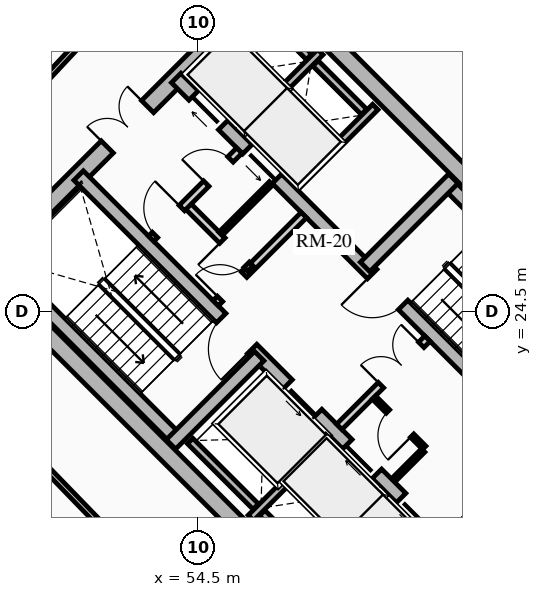
"""IFC4 building model, lengths in metres.
Left out: names, types, materials, properties, quantities, classifications, styles, units other than length and angle.
Written with IfcOpenShell. Run it as: python <this file> out.ifc"""

import sys

from ifc_helpers import new_model, si_unit, direction, frame, frame_2d, origin, place, context, subcontext, project, spatial, rectangle, extrude, source, transform, mapped, element, fill, save


model = new_model("IFC4")
c1 = context("Model", 3, precision=1e-05, world=origin(), true_north=direction((0.0, 1.0)))
c2 = subcontext(c1, "Body", "Model", "MODEL_VIEW")
j1 = project(units=[si_unit("LENGTHUNIT", "METRE"), si_unit("PLANEANGLEUNIT", "RADIAN")], contexts=[c1])
p1 = place(None, origin())
s1 = spatial("IfcSite", under=j1, at=p1, CompositionType="ELEMENT")
p2 = place(p1, origin())
s2 = spatial("IfcBuilding", under=s1, at=p2, CompositionType="ELEMENT")
p3 = place(p2, frame((0.0, 0.0, 129.16)))
s3 = spatial("IfcBuildingStorey", under=s2, at=p3, CompositionType="ELEMENT", Elevation=129.16)
for number, where, z_axis, x_axis in (
    (1, (58.737, 15.697, 0.0), (0.0, 0.0, 1.0), (-0.707, 0.707, 0.0)),
    (2, (66.303, 23.263, 0.0), (0.0, 0.0, 1.0), (-0.707, 0.707, 0.0)),
):
    element("IfcWall", number, at=place(p3, frame(where, z_axis=z_axis, x_axis=x_axis)), inside=s3, PredefinedType="SHEAR", context=c2, shape_type="SweptSolid", body=[
        extrude(rectangle(XDim=14.2, YDim=0.45, at=frame_2d((7.1, 0.0))), origin(), (0.0, 0.0, 1.0), 3.72),
    ])
p4 = place(p3, frame((58.578, 15.856, 0.0), z_axis=(0.0, 0.0, 1.0), x_axis=(0.707106781187, 0.707106781187, 0.0)))
e3 = element("IfcWall", 3, at=p4, inside=s3, PredefinedType="SHEAR", context=c2, shape_type="SweptSolid", body=[
    extrude(rectangle(XDim=10.7, YDim=0.45, at=frame_2d((5.35, 0.0))), origin(), (0.0, 0.0, 1.0), 3.72),
])
m1 = source(origin(), c2, "Body", "SweptSolid", [
    extrude(rectangle(XDim=1.5, YDim=2.02, at=frame_2d((0.75, 1.01))), frame((0.0, 0.235, 0.0), z_axis=(0.0, -1.0, 0.0), x_axis=(1.0, 0.0, 0.0)), (0.0, 0.0, 1.0), 0.47),
])
p5 = place(p4, frame((5.45, 0.0, 0.0)))
e4 = element("IfcOpeningElement", 4, at=p5, cuts=e3, PredefinedType="OPENING", context=c2, shape_type="MappedRepresentation", body=[
    mapped(m1, transform((0.0, 0.0, 0.0), x_axis=(1.0, 0.0, 0.0), y_axis=(0.0, 1.0, 0.0), z_axis=(0.0, 0.0, 1.0), scale=1.0)),
])
p6 = place(p3, frame((48.856, 25.578, 0.0), z_axis=(0.0, 0.0, 1.0), x_axis=(0.707106781187, 0.707106781187, 0.0)))
e5 = element("IfcWall", 5, at=p6, inside=s3, PredefinedType="SHEAR", context=c2, shape_type="SweptSolid", body=[
    extrude(rectangle(XDim=10.7, YDim=0.45, at=frame_2d((5.35, 0.0))), origin(), (0.0, 0.0, 1.0), 3.72),
])
p7 = place(p6, frame((4.6, 0.0, 0.0)))
e6 = element("IfcOpeningElement", 6, at=p7, cuts=e5, PredefinedType="OPENING", context=c2, shape_type="MappedRepresentation", body=[
    mapped(m1, transform((0.0, 0.0, 0.0), x_axis=(1.0, 0.0, 0.0), y_axis=(0.0, 1.0, 0.0), z_axis=(0.0, 0.0, 1.0), scale=1.0)),
])
p8 = place(p3, frame((61.078, 18.355, 0.0), z_axis=(0.0, 0.0, 1.0), x_axis=(-0.707106781187, 0.707106781187, 0.0)))
e7 = element("IfcWall", 7, at=p8, inside=s3, PredefinedType="SHEAR", context=c2, shape_type="SweptSolid", body=[
    extrude(rectangle(XDim=13.75, YDim=0.35, at=frame_2d((6.875, 0.0))), origin(), (0.0, 0.0, 1.0), 3.72),
])
m2 = source(origin(), c2, "Body", "SweptSolid", [
    extrude(rectangle(XDim=1.1, YDim=2.015, at=frame_2d((0.55, 1.007))), frame((0.0, 0.185, 0.0), z_axis=(0.0, -1.0, 0.0), x_axis=(1.0, 0.0, 0.0)), (0.0, 0.0, 1.0), 0.37),
])
p9 = place(p8, frame((4.875, 0.0, 0.0)))
e8 = element("IfcOpeningElement", 8, at=p9, cuts=e7, PredefinedType="OPENING", context=c2, shape_type="MappedRepresentation", body=[
    mapped(m2, transform((0.0, 0.0, 0.0), x_axis=(1.0, 0.0, 0.0), y_axis=(0.0, 1.0, 0.0), z_axis=(0.0, 0.0, 1.0), scale=1.0)),
])
p10 = place(p8, frame((0.65, 0.0, 0.0)))
e9 = element("IfcOpeningElement", 9, at=p10, cuts=e7, PredefinedType="OPENING", context=c2, shape_type="MappedRepresentation", body=[
    mapped(m2, transform((0.0, 0.0, 0.0), x_axis=(1.0, 0.0, 0.0), y_axis=(0.0, 1.0, 0.0), z_axis=(0.0, 0.0, 1.0), scale=1.0)),
])
p11 = place(p8, frame((2.65, 0.0, 0.0)))
e10 = element("IfcOpeningElement", 10, at=p11, cuts=e7, PredefinedType="OPENING", context=c2, shape_type="MappedRepresentation", body=[
    mapped(m2, transform((0.0, 0.0, 0.0), x_axis=(1.0, 0.0, 0.0), y_axis=(0.0, 1.0, 0.0), z_axis=(0.0, 0.0, 1.0), scale=1.0)),
])
m3 = source(origin(), c2, "Body", "SweptSolid", [
    extrude(rectangle(XDim=1.15, YDim=2.02, at=frame_2d((0.575, 1.01))), frame((0.0, 0.185, 0.0), z_axis=(0.0, -1.0, 0.0), x_axis=(1.0, 0.0, 0.0)), (0.0, 0.0, 1.0), 0.37),
])
p12 = place(p8, frame((7.295, 0.0, 0.0)))
e11 = element("IfcOpeningElement", 11, at=p12, cuts=e7, PredefinedType="OPENING", context=c2, shape_type="MappedRepresentation", body=[
    mapped(m3, transform((0.0, 0.0, 0.0), x_axis=(1.0, 0.0, 0.0), y_axis=(0.0, 1.0, 0.0), z_axis=(0.0, 0.0, 1.0), scale=1.0)),
])
p13 = place(p3, frame((63.645, 20.922, 0.0), z_axis=(0.0, 0.0, 1.0), x_axis=(-0.707106781187, 0.707106781187, 0.0)))
e12 = element("IfcWall", 12, at=p13, inside=s3, PredefinedType="SHEAR", context=c2, shape_type="SweptSolid", body=[
    extrude(rectangle(XDim=13.75, YDim=0.35, at=frame_2d((6.875, 0.0))), origin(), (0.0, 0.0, 1.0), 3.72),
])
p14 = place(p13, frame((10.0, 0.0, 0.0)))
e13 = element("IfcOpeningElement", 13, at=p14, cuts=e12, PredefinedType="OPENING", context=c2, shape_type="MappedRepresentation", body=[
    mapped(m2, transform((0.0, 0.0, 0.0), x_axis=(1.0, 0.0, 0.0), y_axis=(0.0, 1.0, 0.0), z_axis=(0.0, 0.0, 1.0), scale=1.0)),
])
p15 = place(p13, frame((12.0, 0.0, 0.0)))
e14 = element("IfcOpeningElement", 14, at=p15, cuts=e12, PredefinedType="OPENING", context=c2, shape_type="MappedRepresentation", body=[
    mapped(m2, transform((0.0, 0.0, 0.0), x_axis=(1.0, 0.0, 0.0), y_axis=(0.0, 1.0, 0.0), z_axis=(0.0, 0.0, 1.0), scale=1.0)),
])
p16 = place(p13, frame((5.305, 0.0, 0.0)))
e15 = element("IfcOpeningElement", 15, at=p16, cuts=e12, PredefinedType="OPENING", context=c2, shape_type="MappedRepresentation", body=[
    mapped(m3, transform((0.0, 0.0, 0.0), x_axis=(1.0, 0.0, 0.0), y_axis=(0.0, 1.0, 0.0), z_axis=(0.0, 0.0, 1.0), scale=1.0)),
])
p17 = place(p3, frame((53.922, 21.141, 0.0), z_axis=(0.0, 0.0, 1.0), x_axis=(-0.707088616009, 0.707124945897, 0.0)))
e16 = element("IfcWall", 16, at=p17, inside=s3, PredefinedType="SHEAR", context=c2, shape_type="SweptSolid", body=[
    extrude(rectangle(XDim=6.72, YDim=0.35, at=frame_2d((3.36, 0.0))), origin(), (0.0, 0.0, 1.0), 3.72),
])
p18 = place(p3, frame((53.784, 21.003, 0.0), z_axis=(0.0, 0.0, 1.0), x_axis=(0.707106781187, 0.707106781187, 0.0)))
e17 = element("IfcWall", 17, at=p18, inside=s3, PredefinedType="SHEAR", context=c2, shape_type="SweptSolid", body=[
    extrude(rectangle(XDim=3.285, YDim=0.35, at=frame_2d((1.643, 0.0))), origin(), (0.0, 0.0, 1.0), 3.72),
])
p19 = place(p3, frame((65.83, 23.107, 0.0), z_axis=(0.0, 0.0, 1.0), x_axis=(-0.707088616009, 0.707124945897, 0.0)))
e18 = element("IfcWall", 18, at=p19, inside=s3, PredefinedType="SHEAR", context=c2, shape_type="SweptSolid", body=[
    extrude(rectangle(XDim=6.72, YDim=0.35, at=frame_2d((3.36, 0.0))), origin(), (0.0, 0.0, 1.0), 3.72),
])
p20 = place(p3, frame((58.893, 25.674, 0.0), z_axis=(0.0, 0.0, 1.0), x_axis=(0.707106781187, 0.707106781187, 0.0)))
e19 = element("IfcWall", 19, at=p20, inside=s3, PredefinedType="SHEAR", context=c2, shape_type="SweptSolid", body=[
    extrude(rectangle(XDim=3.285, YDim=0.35, at=frame_2d((1.643, 0.0))), origin(), (0.0, 0.0, 1.0), 3.72),
])
p21 = place(p3, frame((55.888, 19.069, 0.0), z_axis=(0.0, 0.0, 1.0), x_axis=(0.707106781187, 0.707106781187, 0.0)))
e20 = element("IfcWall", 20, at=p21, inside=s3, PredefinedType="SHEAR", context=c2, shape_type="SweptSolid", body=[
    extrude(rectangle(XDim=2.97, YDim=0.2, at=frame_2d((1.485, 0.0))), origin(), (0.0, 0.0, 1.0), 3.72),
])
p22 = place(p3, frame((56.015, 19.366, 0.0), z_axis=(0.0, 0.0, 1.0), x_axis=(-0.707106781187, 0.707106781187, 0.0)))
e21 = element("IfcWall", 21, at=p22, inside=s3, PredefinedType="SHEAR", context=c2, shape_type="SweptSolid", body=[
    extrude(rectangle(XDim=2.44, YDim=0.2, at=frame_2d((1.22, 0.0))), origin(), (0.0, 0.0, 1.0), 3.72),
])
p23 = place(p3, frame((57.284, 17.673, 0.0), z_axis=(0.0, 0.0, 1.0), x_axis=(0.707147878904, 0.70706568108, 0.0)))
e22 = element("IfcWall", 22, at=p23, inside=s3, PredefinedType="SHEAR", context=c2, shape_type="SweptSolid", body=[
    extrude(rectangle(XDim=2.97, YDim=0.2, at=frame_2d((1.485, 0.0))), origin(), (0.0, 0.0, 1.0), 3.72),
])
p24 = place(p3, frame((57.412, 17.97, 0.0), z_axis=(0.0, 0.0, 1.0), x_axis=(-0.707106781187, 0.707106781187, 0.0)))
e23 = element("IfcWall", 23, at=p24, inside=s3, PredefinedType="SHEAR", context=c2, shape_type="SweptSolid", body=[
    extrude(rectangle(XDim=1.735, YDim=0.2, at=frame_2d((0.867, 0.0))), origin(), (0.0, 0.0, 1.0), 3.72),
])
p25 = place(p3, frame((57.062, 27.781, 0.0), z_axis=(0.0, 0.0, 1.0), x_axis=(0.707106781187, 0.707106781187, 0.0)))
e24 = element("IfcWall", 24, at=p25, inside=s3, PredefinedType="SHEAR", context=c2, shape_type="SweptSolid", body=[
    extrude(rectangle(XDim=2.97, YDim=0.2, at=frame_2d((1.485, 0.0))), origin(), (0.0, 0.0, 1.0), 3.72),
])
p26 = place(p3, frame((55.615, 29.227, 0.0), z_axis=(0.0, 0.0, 1.0), x_axis=(0.707147878904, 0.70706568108, 0.0)))
e25 = element("IfcWall", 25, at=p26, inside=s3, PredefinedType="SHEAR", context=c2, shape_type="SweptSolid", body=[
    extrude(rectangle(XDim=2.97, YDim=0.2, at=frame_2d((1.485, 0.0))), origin(), (0.0, 0.0, 1.0), 3.72),
])
p27 = place(p3, frame((58.865, 29.754, 0.0), z_axis=(0.0, 0.0, 1.0), x_axis=(-0.707174411312, 0.707039144592, 0.0)))
e26 = element("IfcWall", 26, at=p27, inside=s3, PredefinedType="SHEAR", context=c2, shape_type="SweptSolid", body=[
    extrude(rectangle(XDim=1.805, YDim=0.2, at=frame_2d((0.902, 0.0))), origin(), (0.0, 0.0, 1.0), 3.72),
])
p28 = place(p3, frame((57.419, 31.2, 0.0), z_axis=(0.0, 0.0, 1.0), x_axis=(-0.707032117043, 0.707181437447, 0.0)))
e27 = element("IfcWall", 27, at=p28, inside=s3, PredefinedType="SHEAR", context=c2, shape_type="SweptSolid", body=[
    extrude(rectangle(XDim=1.635, YDim=0.2, at=frame_2d((0.817, 0.0))), origin(), (0.0, 0.0, 1.0), 3.72),
])
p29 = place(p3, frame((58.214, 21.467, 0.0), z_axis=(0.0, 0.0, 1.0), x_axis=(0.707106781187, 0.707106781187, 0.0)))
e28 = element("IfcWall", 28, at=p29, inside=s3, PredefinedType="PARTITIONING", context=c2, shape_type="SweptSolid", body=[
    extrude(rectangle(XDim=3.28, YDim=0.2, at=frame_2d((1.64, 0.0))), origin(), (0.0, 0.0, 1.0), 3.425),
])
m4 = source(origin(), c2, "Body", "SweptSolid", [
    extrude(rectangle(XDim=1.5, YDim=2.02, at=frame_2d((0.75, 1.01))), frame((0.0, 0.11, 0.0), z_axis=(0.0, -1.0, 0.0), x_axis=(1.0, 0.0, 0.0)), (0.0, 0.0, 1.0), 0.22),
])
p30 = place(p29, frame((1.55, 0.0, 0.0)))
e29 = element("IfcOpeningElement", 29, at=p30, cuts=e28, PredefinedType="OPENING", context=c2, shape_type="MappedRepresentation", body=[
    mapped(m4, transform((0.0, 0.0, 0.0), x_axis=(1.0, 0.0, 0.0), y_axis=(0.0, 1.0, 0.0), z_axis=(0.0, 0.0, 1.0), scale=1.0)),
])
p31 = place(p3, frame((54.961, 24.719, 0.0), z_axis=(0.0, 0.0, 1.0), x_axis=(0.707106781187, 0.707106781187, 0.0)))
e30 = element("IfcWall", 30, at=p31, inside=s3, PredefinedType="PARTITIONING", context=c2, shape_type="SweptSolid", body=[
    extrude(rectangle(XDim=3.28, YDim=0.2, at=frame_2d((1.64, 0.0))), origin(), (0.0, 0.0, 1.0), 3.425),
])
m5 = source(origin(), c2, "Body", "SweptSolid", [
    extrude(rectangle(XDim=0.9, YDim=2.005, at=frame_2d((0.45, 1.002))), frame((0.0, 0.11, 0.0), z_axis=(0.0, -1.0, 0.0), x_axis=(1.0, 0.0, 0.0)), (0.0, 0.0, 1.0), 0.22),
])
p32 = place(p31, frame((0.16, 0.0, 0.0)))
e31 = element("IfcOpeningElement", 31, at=p32, cuts=e30, PredefinedType="OPENING", context=c2, shape_type="MappedRepresentation", body=[
    mapped(m5, transform((0.0, 0.0, 0.0), x_axis=(1.0, 0.0, 0.0), y_axis=(0.0, 1.0, 0.0), z_axis=(0.0, 0.0, 1.0), scale=1.0)),
])
p33 = place(p3, frame((55.874, 25.631, 0.0), z_axis=(0.0, 0.0, 1.0), x_axis=(-0.707157639372, 0.707055919343, 0.0)))
e32 = element("IfcWall", 32, at=p33, inside=s3, PredefinedType="PARTITIONING", context=c2, shape_type="SweptSolid", body=[
    extrude(rectangle(XDim=2.4, YDim=0.2, at=frame_2d((1.2, 0.0))), origin(), (0.0, 0.0, 1.0), 3.425),
])
p34 = place(p33, frame((0.14, 0.0, 0.0)))
e33 = element("IfcOpeningElement", 33, at=p34, cuts=e32, PredefinedType="OPENING", context=c2, shape_type="MappedRepresentation", body=[
    mapped(m5, transform((0.0, 0.0, 0.0), x_axis=(1.0, 0.0, 0.0), y_axis=(0.0, 1.0, 0.0), z_axis=(0.0, 0.0, 1.0), scale=1.0)),
])
p35 = place(p3, frame((53.264, 26.416, 0.0), z_axis=(0.0, 0.0, 1.0), x_axis=(0.707106781187, 0.707106781187, 0.0)))
e34 = element("IfcWall", 34, at=p35, inside=s3, PredefinedType="PARTITIONING", context=c2, shape_type="SweptSolid", body=[
    extrude(rectangle(XDim=3.28, YDim=0.2, at=frame_2d((1.64, 0.0))), origin(), (0.0, 0.0, 1.0), 3.425),
])
m6 = source(origin(), c2, "Body", "SweptSolid", [
    extrude(rectangle(XDim=1.0, YDim=2.015, at=frame_2d((0.5, 1.007))), frame((0.0, 0.11, 0.0), z_axis=(0.0, -1.0, 0.0), x_axis=(1.0, 0.0, 0.0)), (0.0, 0.0, 1.0), 0.22),
])
p36 = place(p35, frame((0.14, 0.0, 0.0)))
e35 = element("IfcOpeningElement", 35, at=p36, cuts=e34, PredefinedType="OPENING", context=c2, shape_type="MappedRepresentation", body=[
    mapped(m6, transform((0.0, 0.0, 0.0), x_axis=(1.0, 0.0, 0.0), y_axis=(0.0, 1.0, 0.0), z_axis=(0.0, 0.0, 1.0), scale=1.0)),
])
p37 = place(p35, frame((2.05, 0.0, 0.0)))
e36 = element("IfcOpeningElement", 36, at=p37, cuts=e34, PredefinedType="OPENING", context=c2, shape_type="MappedRepresentation", body=[
    mapped(m5, transform((0.0, 0.0, 0.0), x_axis=(1.0, 0.0, 0.0), y_axis=(0.0, 1.0, 0.0), z_axis=(0.0, 0.0, 1.0), scale=1.0)),
])
p38 = place(p3, frame((60.448, 20.915, 0.0), z_axis=(0.0, 0.0, 1.0), x_axis=(-0.707106781187, 0.707106781187, 0.0)))
e37 = element("IfcWall", 37, at=p38, inside=s3, PredefinedType="PARTITIONING", context=c2, shape_type="SweptSolid", body=[
    extrude(rectangle(XDim=1.87, YDim=0.125, at=frame_2d((0.935, 0.0))), origin(), (0.0, 0.0, 1.0), 3.425),
])
m7 = source(origin(), c2, "Body", "SweptSolid", [
    extrude(rectangle(XDim=0.9, YDim=2.005, at=frame_2d((0.45, 1.002))), frame((0.0, 0.073, 0.0), z_axis=(0.0, -1.0, 0.0), x_axis=(1.0, 0.0, 0.0)), (0.0, 0.0, 1.0), 0.145),
])
p39 = place(p38, frame((0.45, 0.0, 0.0)))
e38 = element("IfcOpeningElement", 38, at=p39, cuts=e37, PredefinedType="OPENING", context=c2, shape_type="MappedRepresentation", body=[
    mapped(m7, transform((0.0, 0.0, 0.0), x_axis=(1.0, 0.0, 0.0), y_axis=(0.0, 1.0, 0.0), z_axis=(0.0, 0.0, 1.0), scale=1.0)),
])
p40 = place(p3, frame((59.643, 20.066, 0.0), z_axis=(0.0, 0.0, 1.0), x_axis=(0.707106781187, 0.707106781187, 0.0)))
e39 = element("IfcWall", 39, at=p40, inside=s3, PredefinedType="PARTITIONING", context=c2, shape_type="SweptSolid", body=[
    extrude(rectangle(XDim=1.1, YDim=0.125, at=frame_2d((0.55, 0.0))), origin(), (0.0, 0.0, 1.0), 3.425),
])
p41 = place(p3, frame((55.089, 26.543, 0.0), z_axis=(0.0, 0.0, 1.0), x_axis=(0.707106781187, 0.707106781187, 0.0)))
e40 = element("IfcWall", 40, at=p41, inside=s3, PredefinedType="PARTITIONING", context=c2, shape_type="SweptSolid", body=[
    extrude(rectangle(XDim=1.88, YDim=0.125, at=frame_2d((0.94, 0.0))), origin(), (0.0, 0.0, 1.0), 3.425),
])
p42 = place(p3, frame((63.086, 30.086, 0.0), z_axis=(0.0, 0.0, 1.0), x_axis=(-0.699075897379, 0.715047473741, 0.0)))
e41 = element("IfcWall", 41, at=p42, inside=s3, PredefinedType="PARTITIONING", context=c2, shape_type="SweptSolid", body=[
    extrude(rectangle(XDim=6.114, YDim=0.15, at=frame_2d((3.057, 0.0))), origin(), (0.0, 0.0, 1.0), 2.995),
])
p43 = place(p3, frame((52.043, 32.28, 0.0), z_axis=(0.0, 0.0, 1.0), x_axis=(-0.682606081633, -0.730786519661, 0.0)))
e42 = element("IfcWall", 42, at=p43, inside=s3, PredefinedType="PARTITIONING", context=c2, shape_type="SweptSolid", body=[
    extrude(rectangle(XDim=6.527, YDim=0.15, at=frame_2d((3.263, 0.0))), origin(), (0.0, 0.0, 1.0), 2.995),
])
p44 = place(p3, frame((47.706, 23.253, 0.0), z_axis=(0.0, 0.0, 1.0), x_axis=(0.696179266346, -0.717867974707, 0.0)))
e43 = element("IfcWall", 43, at=p44, inside=s3, PredefinedType="PARTITIONING", context=c2, shape_type="SweptSolid", body=[
    extrude(rectangle(XDim=6.045, YDim=0.15, at=frame_2d((3.022, 0.0))), origin(), (0.0, 0.0, 1.0), 3.425),
])
m8 = source(origin(), c2, "Body", "SweptSolid", [
    extrude(rectangle(XDim=1.1, YDim=2.015, at=frame_2d((0.55, 1.007))), frame((0.0, 0.025, 0.0), z_axis=(0.0, -1.0, 0.0), x_axis=(1.0, 0.0, 0.0)), (0.0, 0.0, 1.0), 0.05),
])
p45 = place(p9, origin())
e44 = element("IfcDoor", 44, at=p45, inside=s3, OperationType="SLIDING_TO_LEFT", PredefinedType="DOOR", context=c2, shape_type="MappedRepresentation", body=[
    mapped(m8, transform((0.0, 0.0, 0.0), x_axis=(1.0, 0.0, 0.0), y_axis=(0.0, 1.0, 0.0), z_axis=(0.0, 0.0, 1.0), scale=1.0)),
])
fill(e8, e44)
p46 = place(p10, origin())
e45 = element("IfcDoor", 45, at=p46, inside=s3, OperationType="SLIDING_TO_LEFT", PredefinedType="DOOR", context=c2, shape_type="MappedRepresentation", body=[
    mapped(m8, transform((0.0, 0.0, 0.0), x_axis=(1.0, 0.0, 0.0), y_axis=(0.0, 1.0, 0.0), z_axis=(0.0, 0.0, 1.0), scale=1.0)),
])
fill(e9, e45)
p47 = place(p11, origin())
e46 = element("IfcDoor", 46, at=p47, inside=s3, OperationType="SLIDING_TO_RIGHT", PredefinedType="DOOR", context=c2, shape_type="MappedRepresentation", body=[
    mapped(m8, transform((0.0, 0.0, 0.0), x_axis=(1.0, 0.0, 0.0), y_axis=(0.0, 1.0, 0.0), z_axis=(0.0, 0.0, 1.0), scale=1.0)),
])
fill(e10, e46)
p48 = place(p14, origin())
e47 = element("IfcDoor", 47, at=p48, inside=s3, OperationType="SLIDING_TO_LEFT", PredefinedType="DOOR", context=c2, shape_type="MappedRepresentation", body=[
    mapped(m8, transform((0.0, 0.0, 0.0), x_axis=(1.0, 0.0, 0.0), y_axis=(0.0, 1.0, 0.0), z_axis=(0.0, 0.0, 1.0), scale=1.0)),
])
fill(e13, e47)
p49 = place(p15, origin())
e48 = element("IfcDoor", 48, at=p49, inside=s3, OperationType="SLIDING_TO_RIGHT", PredefinedType="DOOR", context=c2, shape_type="MappedRepresentation", body=[
    mapped(m8, transform((0.0, 0.0, 0.0), x_axis=(1.0, 0.0, 0.0), y_axis=(0.0, 1.0, 0.0), z_axis=(0.0, 0.0, 1.0), scale=1.0)),
])
fill(e14, e48)
m9 = source(origin(), c2, "Body", "SweptSolid", [
    extrude(rectangle(XDim=1.15, YDim=2.02, at=frame_2d((0.575, 1.01))), frame((0.0, 0.025, 0.0), z_axis=(0.0, -1.0, 0.0), x_axis=(1.0, 0.0, 0.0)), (0.0, 0.0, 1.0), 0.05),
])
p50 = place(p12, origin())
e49 = element("IfcDoor", 49, at=p50, inside=s3, OperationType="SINGLE_SWING_LEFT", PredefinedType="DOOR", context=c2, shape_type="MappedRepresentation", body=[
    mapped(m9, transform((0.0, 0.0, 0.0), x_axis=(1.0, 0.0, 0.0), y_axis=(0.0, 1.0, 0.0), z_axis=(0.0, 0.0, 1.0), scale=1.0)),
])
fill(e11, e49)
p51 = place(p16, origin())
e50 = element("IfcDoor", 50, at=p51, inside=s3, OperationType="SINGLE_SWING_RIGHT", PredefinedType="DOOR", context=c2, shape_type="MappedRepresentation", body=[
    mapped(m9, transform((0.0, 0.0, 0.0), x_axis=(1.0, 0.0, 0.0), y_axis=(0.0, 1.0, 0.0), z_axis=(0.0, 0.0, 1.0), scale=1.0)),
])
fill(e15, e50)
m10 = source(origin(), c2, "Body", "SweptSolid", [
    extrude(rectangle(XDim=1.5, YDim=2.02, at=frame_2d((0.75, 1.01))), frame((0.0, 0.025, 0.0), z_axis=(0.0, -1.0, 0.0), x_axis=(1.0, 0.0, 0.0)), (0.0, 0.0, 1.0), 0.05),
])
p52 = place(p7, origin())
e51 = element("IfcDoor", 51, at=p52, inside=s3, OperationType="DOUBLE_DOOR_SINGLE_SWING", PredefinedType="DOOR", context=c2, shape_type="MappedRepresentation", body=[
    mapped(m10, transform((0.0, 0.0, 0.0), x_axis=(1.0, 0.0, 0.0), y_axis=(0.0, 1.0, 0.0), z_axis=(0.0, 0.0, 1.0), scale=1.0)),
])
fill(e6, e51)
p53 = place(p30, origin())
e52 = element("IfcDoor", 52, at=p53, inside=s3, OperationType="DOUBLE_DOOR_SINGLE_SWING", PredefinedType="DOOR", context=c2, shape_type="MappedRepresentation", body=[
    mapped(m10, transform((0.0, 0.0, 0.0), x_axis=(1.0, 0.0, 0.0), y_axis=(0.0, 1.0, 0.0), z_axis=(0.0, 0.0, 1.0), scale=1.0)),
])
fill(e29, e52)
m11 = source(origin(), c2, "Body", "SweptSolid", [
    extrude(rectangle(XDim=0.9, YDim=2.005, at=frame_2d((0.45, 1.002))), frame((0.0, 0.025, 0.0), z_axis=(0.0, -1.0, 0.0), x_axis=(1.0, 0.0, 0.0)), (0.0, 0.0, 1.0), 0.05),
])
p54 = place(p32, origin())
e53 = element("IfcDoor", 53, at=p54, inside=s3, OperationType="SINGLE_SWING_LEFT", PredefinedType="DOOR", context=c2, shape_type="MappedRepresentation", body=[
    mapped(m11, transform((0.0, 0.0, 0.0), x_axis=(1.0, 0.0, 0.0), y_axis=(0.0, 1.0, 0.0), z_axis=(0.0, 0.0, 1.0), scale=1.0)),
])
fill(e31, e53)
m12 = source(origin(), c2, "Body", "SweptSolid", [
    extrude(rectangle(XDim=1.0, YDim=2.015, at=frame_2d((0.5, 1.007))), frame((0.0, 0.025, 0.0), z_axis=(0.0, -1.0, 0.0), x_axis=(1.0, 0.0, 0.0)), (0.0, 0.0, 1.0), 0.05),
])
p55 = place(p36, origin())
e54 = element("IfcDoor", 54, at=p55, inside=s3, OperationType="SINGLE_SWING_RIGHT", PredefinedType="DOOR", context=c2, shape_type="MappedRepresentation", body=[
    mapped(m12, transform((0.0, 0.0, 0.0), x_axis=(1.0, 0.0, 0.0), y_axis=(0.0, 1.0, 0.0), z_axis=(0.0, 0.0, 1.0), scale=1.0)),
])
fill(e35, e54)
p56 = place(p39, origin())
e55 = element("IfcDoor", 55, at=p56, inside=s3, OperationType="SINGLE_SWING_LEFT", PredefinedType="DOOR", context=c2, shape_type="MappedRepresentation", body=[
    mapped(m11, transform((0.0, 0.0, 0.0), x_axis=(1.0, 0.0, 0.0), y_axis=(0.0, 1.0, 0.0), z_axis=(0.0, 0.0, 1.0), scale=1.0)),
])
fill(e38, e55)
p57 = place(p34, origin())
e56 = element("IfcDoor", 56, at=p57, inside=s3, OperationType="SINGLE_SWING_RIGHT", PredefinedType="DOOR", context=c2, shape_type="MappedRepresentation", body=[
    mapped(m11, transform((0.0, 0.0, 0.0), x_axis=(1.0, 0.0, 0.0), y_axis=(0.0, 1.0, 0.0), z_axis=(0.0, 0.0, 1.0), scale=1.0)),
])
fill(e33, e56)
p58 = place(p37, origin())
e57 = element("IfcDoor", 57, at=p58, inside=s3, OperationType="SINGLE_SWING_LEFT", PredefinedType="DOOR", context=c2, shape_type="MappedRepresentation", body=[
    mapped(m11, transform((0.0, 0.0, 0.0), x_axis=(1.0, 0.0, 0.0), y_axis=(0.0, 1.0, 0.0), z_axis=(0.0, 0.0, 1.0), scale=1.0)),
])
fill(e36, e57)
save(model, sys.argv[1])
